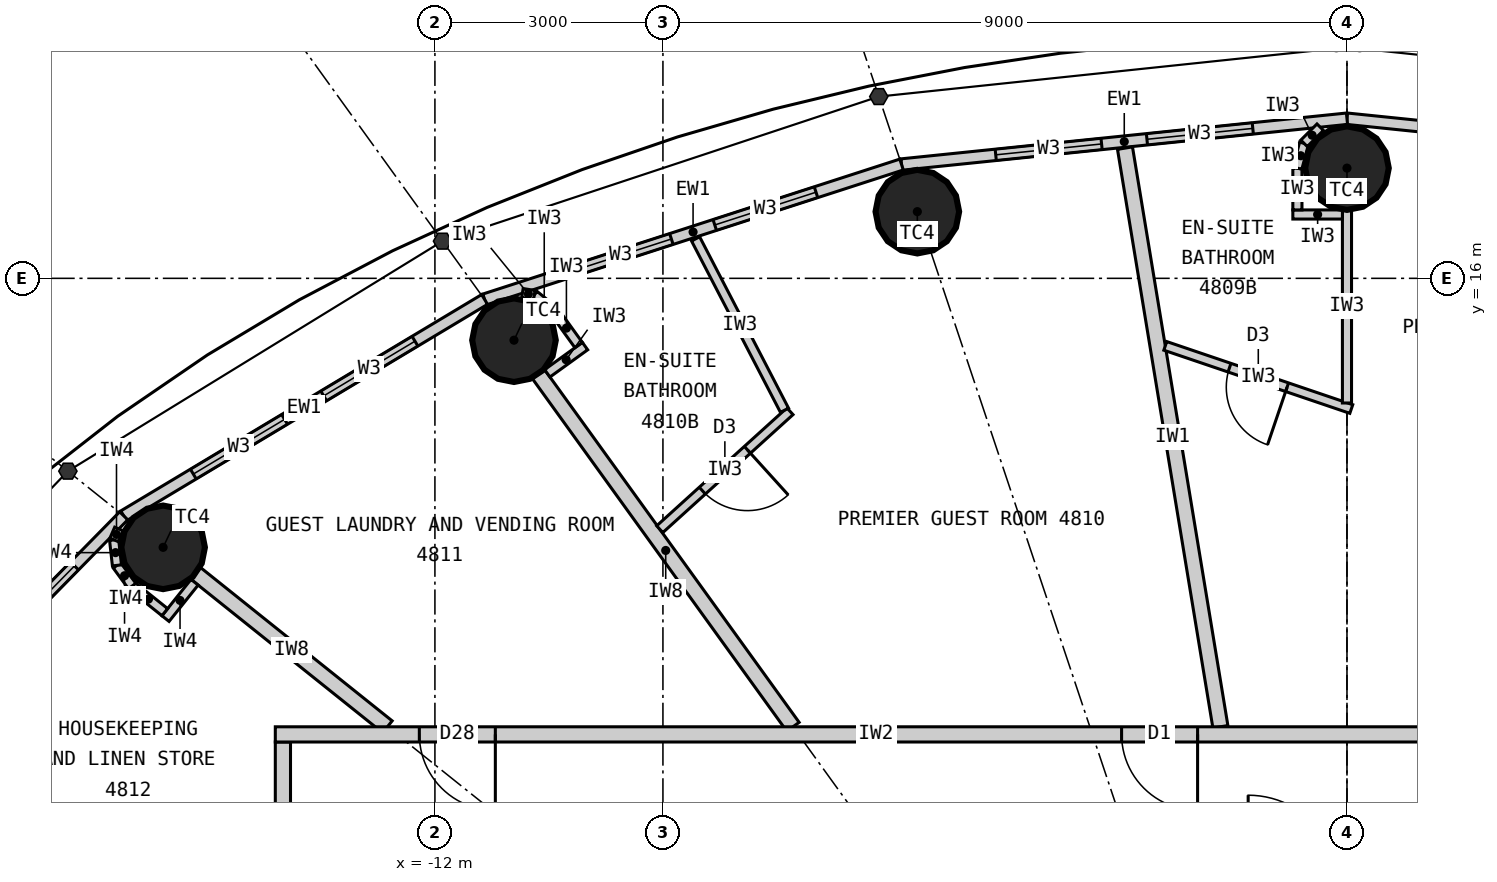
"""IFC4 building model, lengths in metres.
Left out: names, types, materials, properties, quantities, classifications, styles, units other than length and angle.
Written with IfcOpenShell. Run it as: python <this file> out.ifc"""

import sys

from ifc_helpers import new_model, si_unit, direction, frame, frame_2d, origin, origin_2d, place, context, subcontext, project, spatial, rectangle, circle, extrude, element, fill, save


model = new_model("IFC4")
c1 = context("Model", 3, precision=1e-05, world=origin(), true_north=direction((0.0, 1.0)))
c2 = subcontext(c1, "Body", "Model", "MODEL_VIEW")
j1 = project(units=[si_unit("LENGTHUNIT", "METRE"), si_unit("PLANEANGLEUNIT", "RADIAN")], contexts=[c1])
p1 = place(None, origin())
s1 = spatial("IfcSite", under=j1, at=p1, CompositionType="ELEMENT")
p2 = place(p1, origin())
s2 = spatial("IfcBuilding", under=s1, at=p2, CompositionType="ELEMENT")
p3 = place(p2, frame((0.0, 0.0, 179.7)))
s3 = spatial("IfcBuildingStorey", under=s2, at=p3, CompositionType="ELEMENT", Elevation=179.7)
for number, where, z_axis, x_axis in (
    (1, (0.0, 17.45, 0.0), (0.0, 0.0, 1.0), (1.0, 0.0, 0.0)),
    (2, (-5.653, 16.877, 0.0), (0.0, 0.0, 1.0), (1.0, 0.0, 0.0)),
    (3, (-10.96, 15.186, 0.0), (0.0, 0.0, 1.0), (1.0, 0.0, 0.0)),
    (4, (-15.576, 12.461, 0.0), (0.0, 0.0, 1.0), (1.0, 0.0, 0.0)),
):
    element("IfcColumn", number, at=place(p3, frame(where, z_axis=z_axis, x_axis=x_axis)), inside=s3, PredefinedType="COLUMN", context=c2, shape_type="SweptSolid", body=[
        extrude(circle(Radius=0.55, at=origin_2d()), origin(), (0.0, 0.0, 1.0), 3.3),
    ])
p4 = place(p3, frame((5.86, 17.497, 0.0), z_axis=(0.0, 0.0, 1.0), x_axis=(-0.994751738032, 0.102318032045, 0.0)))
e5 = element("IfcWall", 5, at=p4, inside=s3, PredefinedType="ELEMENTEDWALL", context=c2, shape_type="SweptSolid", body=[
    extrude(rectangle(XDim=5.891, YDim=0.15, at=frame_2d((2.946, 0.0))), origin(), (0.0, 0.0, 1.0), 3.12),
])
p5 = place(p4, frame((1.246, 0.0, 0.9)))
e6 = element("IfcOpeningElement", 6, at=p5, cuts=e5, PredefinedType="OPENING", context=c2, shape_type="SweptSolid", body=[
    extrude(rectangle(XDim=1.4, YDim=1.9, at=frame_2d((0.7, 0.95))), frame((0.0, 0.085, 0.0), z_axis=(0.0, -1.0, 0.0), x_axis=(1.0, 0.0, 0.0)), (0.0, 0.0, 1.0), 0.17),
])
p6 = place(p4, frame((3.246, 0.0, 0.9)))
e7 = element("IfcOpeningElement", 7, at=p6, cuts=e5, PredefinedType="OPENING", context=c2, shape_type="SweptSolid", body=[
    extrude(rectangle(XDim=1.4, YDim=1.9, at=frame_2d((0.7, 0.95))), frame((0.0, 0.085, 0.0), z_axis=(0.0, -1.0, 0.0), x_axis=(1.0, 0.0, 0.0)), (0.0, 0.0, 1.0), 0.17),
])
p7 = place(p3, frame((0.0, 18.1, 0.0), z_axis=(0.0, 0.0, 1.0), x_axis=(-0.994751738032, -0.102318032045, 0.0)))
e8 = element("IfcWall", 8, at=p7, inside=s3, PredefinedType="ELEMENTEDWALL", context=c2, shape_type="SweptSolid", body=[
    extrude(rectangle(XDim=5.891, YDim=0.15, at=frame_2d((2.946, 0.0))), origin(), (0.0, 0.0, 1.0), 3.12),
])
p8 = place(p7, frame((1.246, 0.0, 0.9)))
e9 = element("IfcOpeningElement", 9, at=p8, cuts=e8, PredefinedType="OPENING", context=c2, shape_type="SweptSolid", body=[
    extrude(rectangle(XDim=1.4, YDim=1.9, at=frame_2d((0.7, 0.95))), frame((0.0, 0.085, 0.0), z_axis=(0.0, -1.0, 0.0), x_axis=(1.0, 0.0, 0.0)), (0.0, 0.0, 1.0), 0.17),
])
p9 = place(p7, frame((3.246, 0.0, 0.9)))
e10 = element("IfcOpeningElement", 10, at=p9, cuts=e8, PredefinedType="OPENING", context=c2, shape_type="SweptSolid", body=[
    extrude(rectangle(XDim=1.4, YDim=1.9, at=frame_2d((0.7, 0.95))), frame((0.0, 0.085, 0.0), z_axis=(0.0, -1.0, 0.0), x_axis=(1.0, 0.0, 0.0)), (0.0, 0.0, 1.0), 0.17),
])
p10 = place(p3, frame((-5.86, 17.497, 0.0), z_axis=(0.0, 0.0, 1.0), x_axis=(-0.951432482129, -0.307857486429, 0.0)))
e11 = element("IfcWall", 11, at=p10, inside=s3, PredefinedType="ELEMENTEDWALL", context=c2, shape_type="SweptSolid", body=[
    extrude(rectangle(XDim=5.766, YDim=0.15, at=frame_2d((2.883, 0.0))), origin(), (0.0, 0.0, 1.0), 3.12),
])
p11 = place(p10, frame((1.183, 0.0, 0.9)))
e12 = element("IfcOpeningElement", 12, at=p11, cuts=e11, PredefinedType="OPENING", context=c2, shape_type="SweptSolid", body=[
    extrude(rectangle(XDim=1.4, YDim=1.9, at=frame_2d((0.7, 0.95))), frame((0.0, 0.085, 0.0), z_axis=(0.0, -1.0, 0.0), x_axis=(1.0, 0.0, 0.0)), (0.0, 0.0, 1.0), 0.17),
])
p12 = place(p10, frame((3.183, 0.0, 0.9)))
e13 = element("IfcOpeningElement", 13, at=p12, cuts=e11, PredefinedType="OPENING", context=c2, shape_type="SweptSolid", body=[
    extrude(rectangle(XDim=1.4, YDim=1.9, at=frame_2d((0.7, 0.95))), frame((0.0, 0.085, 0.0), z_axis=(0.0, -1.0, 0.0), x_axis=(1.0, 0.0, 0.0)), (0.0, 0.0, 1.0), 0.17),
])
p13 = place(p3, frame((-11.346, 15.722, 0.0), z_axis=(0.0, 0.0, 1.0), x_axis=(-0.857695199231, -0.514158482587, 0.0)))
e14 = element("IfcWall", 14, at=p13, inside=s3, PredefinedType="ELEMENTEDWALL", context=c2, shape_type="SweptSolid", body=[
    extrude(rectangle(XDim=5.536, YDim=0.15, at=frame_2d((2.768, 0.0))), origin(), (0.0, 0.0, 1.0), 3.12),
])
p14 = place(p13, frame((1.068, 0.0, 0.9)))
e15 = element("IfcOpeningElement", 15, at=p14, cuts=e14, PredefinedType="OPENING", context=c2, shape_type="SweptSolid", body=[
    extrude(rectangle(XDim=1.4, YDim=1.9, at=frame_2d((0.7, 0.95))), frame((0.0, 0.085, 0.0), z_axis=(0.0, -1.0, 0.0), x_axis=(1.0, 0.0, 0.0)), (0.0, 0.0, 1.0), 0.17),
])
p15 = place(p13, frame((3.068, 0.0, 0.9)))
e16 = element("IfcOpeningElement", 16, at=p15, cuts=e14, PredefinedType="OPENING", context=c2, shape_type="SweptSolid", body=[
    extrude(rectangle(XDim=1.4, YDim=1.9, at=frame_2d((0.7, 0.95))), frame((0.0, 0.085, 0.0), z_axis=(0.0, -1.0, 0.0), x_axis=(1.0, 0.0, 0.0)), (0.0, 0.0, 1.0), 0.17),
])
p16 = place(p3, frame((-16.095, 12.876, 0.0), z_axis=(0.0, 0.0, 1.0), x_axis=(-0.700727467776, -0.71342905457, 0.0)))
e17 = element("IfcWall", 17, at=p16, inside=s3, PredefinedType="ELEMENTEDWALL", context=c2, shape_type="SweptSolid", body=[
    extrude(rectangle(XDim=5.247, YDim=0.15, at=frame_2d((2.624, 0.0))), origin(), (0.0, 0.0, 1.0), 3.12),
])
p17 = place(p16, frame((0.924, 0.0, 0.9)))
e18 = element("IfcOpeningElement", 18, at=p17, cuts=e17, PredefinedType="OPENING", context=c2, shape_type="SweptSolid", body=[
    extrude(rectangle(XDim=1.4, YDim=1.9, at=frame_2d((0.7, 0.95))), frame((0.0, 0.085, 0.0), z_axis=(0.0, -1.0, 0.0), x_axis=(1.0, 0.0, 0.0)), (0.0, 0.0, 1.0), 0.17),
])
p18 = place(p16, frame((2.924, 0.0, 0.9)))
e19 = element("IfcOpeningElement", 19, at=p18, cuts=e17, PredefinedType="OPENING", context=c2, shape_type="SweptSolid", body=[
    extrude(rectangle(XDim=1.4, YDim=1.9, at=frame_2d((0.7, 0.95))), frame((0.0, 0.085, 0.0), z_axis=(0.0, -1.0, 0.0), x_axis=(1.0, 0.0, 0.0)), (0.0, 0.0, 1.0), 0.17),
])
p19 = place(p3, frame((-14.0, 9.9, 0.0), z_axis=(0.0, 0.0, 1.0), x_axis=(0.0, -1.0, 0.0)))
e20 = element("IfcWall", 20, at=p19, inside=s3, PredefinedType="PARTITIONING", context=c2, shape_type="SweptSolid", body=[
    extrude(rectangle(XDim=19.8, YDim=0.2, at=frame_2d((9.9, 0.0))), origin(), (0.0, 0.0, 1.0), 3.12),
])
p20 = place(p19, frame((13.853, 0.0, 0.0)))
e21 = element("IfcOpeningElement", 21, at=p20, cuts=e20, PredefinedType="OPENING", context=c2, shape_type="SweptSolid", body=[
    extrude(rectangle(XDim=1.0, YDim=2.2, at=frame_2d((0.5, 1.1))), frame((0.0, 0.11, 0.0), z_axis=(0.0, -1.0, 0.0), x_axis=(1.0, 0.0, 0.0)), (0.0, 0.0, 1.0), 0.22),
])
p21 = place(p19, frame((1.1, 0.0, 0.0)))
e22 = element("IfcOpeningElement", 22, at=p21, cuts=e20, PredefinedType="OPENING", context=c2, shape_type="SweptSolid", body=[
    extrude(rectangle(XDim=1.0, YDim=2.2, at=frame_2d((0.5, 1.1))), frame((0.0, 0.11, 0.0), z_axis=(0.0, -1.0, 0.0), x_axis=(1.0, 0.0, 0.0)), (0.0, 0.0, 1.0), 0.22),
])
p22 = place(p19, frame((3.688, 0.0, 0.0)))
e23 = element("IfcOpeningElement", 23, at=p22, cuts=e20, PredefinedType="OPENING", context=c2, shape_type="SweptSolid", body=[
    extrude(rectangle(XDim=1.0, YDim=2.2, at=frame_2d((0.5, 1.1))), frame((0.0, 0.11, 0.0), z_axis=(0.0, -1.0, 0.0), x_axis=(1.0, 0.0, 0.0)), (0.0, 0.0, 1.0), 0.22),
])
p23 = place(p19, frame((8.719, 0.0, 0.0)))
e24 = element("IfcOpeningElement", 24, at=p23, cuts=e20, PredefinedType="OPENING", context=c2, shape_type="SweptSolid", body=[
    extrude(rectangle(XDim=1.0, YDim=2.2, at=frame_2d((0.5, 1.1))), frame((0.0, 0.11, 0.0), z_axis=(0.0, -1.0, 0.0), x_axis=(1.0, 0.0, 0.0)), (0.0, 0.0, 1.0), 0.22),
])
p24 = place(p3, frame((-1.666, 10.1, 0.0), z_axis=(0.0, 0.0, 1.0), x_axis=(-0.162669562982, 0.986680603478, 0.0)))
e25 = element("IfcWall", 25, at=p24, inside=s3, PredefinedType="PARTITIONING", context=c2, shape_type="SweptSolid", body=[
    extrude(rectangle(XDim=7.716, YDim=0.2, at=frame_2d((3.858, 0.0))), origin(), (0.0, 0.0, 1.0), 3.12),
])
p25 = place(p3, frame((-7.289, 10.1, 0.0), z_axis=(0.0, 0.0, 1.0), x_axis=(-0.585222595178, 0.810872686735, 0.0)))
e26 = element("IfcWall", 26, at=p25, inside=s3, PredefinedType="PARTITIONING", context=c2, shape_type="SweptSolid", body=[
    extrude(rectangle(XDim=5.722, YDim=0.2, at=frame_2d((2.861, 0.0))), origin(), (0.0, 0.0, 1.0), 2.27),
])
p26 = place(p3, frame((-12.625, 10.1, 0.0), z_axis=(0.0, 0.0, 1.0), x_axis=(-0.780876185034, 0.624685827954, 0.0)))
e27 = element("IfcWall", 27, at=p26, inside=s3, PredefinedType="PARTITIONING", context=c2, shape_type="SweptSolid", body=[
    extrude(rectangle(XDim=3.229, YDim=0.2, at=frame_2d((1.615, 0.0))), origin(), (0.0, 0.0, 1.0), 2.27),
])
p27 = place(p3, frame((-2.39, 15.111, 0.0), z_axis=(0.0, 0.0, 1.0), x_axis=(0.946949953534, -0.321381059649, 0.0)))
e28 = element("IfcWall", 28, at=p27, inside=s3, PredefinedType="PARTITIONING", context=c2, shape_type="SweptSolid", body=[
    extrude(rectangle(XDim=2.584, YDim=0.12, at=frame_2d((1.292, 0.0))), origin(), (0.0, 0.0, 1.0), 3.12),
])
p28 = place(p27, frame((0.892, 0.0, 0.0)))
e29 = element("IfcOpeningElement", 29, at=p28, cuts=e28, PredefinedType="OPENING", context=c2, shape_type="SweptSolid", body=[
    extrude(rectangle(XDim=0.8, YDim=2.1, at=frame_2d((0.4, 1.05))), frame((0.0, 0.07, 0.0), z_axis=(0.0, -1.0, 0.0), x_axis=(1.0, 0.0, 0.0)), (0.0, 0.0, 1.0), 0.14),
])
p29 = place(p3, frame((0.0, 14.36, 0.0), z_axis=(0.0, 0.0, 1.0), x_axis=(0.0, 1.0, 0.0)))
e30 = element("IfcWall", 30, at=p29, inside=s3, PredefinedType="PARTITIONING", context=c2, shape_type="SweptSolid", body=[
    extrude(rectangle(XDim=2.54, YDim=0.12, at=frame_2d((1.27, 0.0))), origin(), (0.0, 0.0, 1.0), 2.27),
])
p30 = place(p3, frame((-0.06, 16.84, 0.0), z_axis=(0.0, 0.0, 1.0), x_axis=(-1.0, 0.0, 0.0)))
e31 = element("IfcWall", 31, at=p30, inside=s3, PredefinedType="PARTITIONING", context=c2, shape_type="SweptSolid", body=[
    extrude(rectangle(XDim=0.652, YDim=0.12, at=frame_2d((0.326, 0.0))), origin(), (0.0, 0.0, 1.0), 3.12),
])
p31 = place(p3, frame((-0.652, 16.9, 0.0), z_axis=(0.0, 0.0, 1.0), x_axis=(0.0, 1.0, 0.0)))
e32 = element("IfcWall", 32, at=p31, inside=s3, PredefinedType="PARTITIONING", context=c2, shape_type="SweptSolid", body=[
    extrude(rectangle(XDim=0.55, YDim=0.12, at=frame_2d((0.275, 0.0))), origin(), (0.0, 0.0, 1.0), 3.12),
])
p32 = place(p3, frame((-0.652, 17.45, 0.0), z_axis=(0.0, 0.0, 1.0), x_axis=(0.258832454679, 0.965922233104, 0.0)))
e33 = element("IfcWall", 33, at=p32, inside=s3, PredefinedType="PARTITIONING", context=c2, shape_type="SweptSolid", body=[
    extrude(rectangle(XDim=0.338, YDim=0.12, at=frame_2d((0.169, 0.0))), origin(), (0.0, 0.0, 1.0), 3.12),
])
p33 = place(p3, frame((-0.565, 17.776, 0.0), z_axis=(0.0, 0.0, 1.0), x_axis=(0.707106781187, 0.707106781187, 0.0)))
e34 = element("IfcWall", 34, at=p33, inside=s3, PredefinedType="PARTITIONING", context=c2, shape_type="SweptSolid", body=[
    extrude(rectangle(XDim=0.301, YDim=0.12, at=frame_2d((0.15, 0.0))), origin(), (0.0, 0.0, 1.0), 3.12),
])
p34 = place(p3, frame((-9.042, 12.699, 0.0), z_axis=(0.0, 0.0, 1.0), x_axis=(0.741100257539, 0.671394376112, 0.0)))
e35 = element("IfcWall", 35, at=p34, inside=s3, PredefinedType="PARTITIONING", context=c2, shape_type="SweptSolid", body=[
    extrude(rectangle(XDim=2.312, YDim=0.12, at=frame_2d((1.156, 0.0))), origin(), (0.0, 0.0, 1.0), 3.12),
])
p35 = place(p34, frame((0.756, 0.0, 0.0)))
e36 = element("IfcOpeningElement", 36, at=p35, cuts=e35, PredefinedType="OPENING", context=c2, shape_type="SweptSolid", body=[
    extrude(rectangle(XDim=0.8, YDim=2.1, at=frame_2d((0.4, 1.05))), frame((0.0, 0.07, 0.0), z_axis=(0.0, -1.0, 0.0), x_axis=(1.0, 0.0, 0.0)), (0.0, 0.0, 1.0), 0.14),
])
p36 = place(p3, frame((-7.401, 14.264, 0.0), z_axis=(0.0, 0.0, 1.0), x_axis=(-0.460505131319, 0.887657041897, 0.0)))
e37 = element("IfcWall", 37, at=p36, inside=s3, PredefinedType="PARTITIONING", context=c2, shape_type="SweptSolid", body=[
    extrude(rectangle(XDim=2.54, YDim=0.12, at=frame_2d((1.27, 0.0))), origin(), (0.0, 0.0, 1.0), 3.12),
])
p37 = place(p3, frame((-10.522, 14.75, 0.0), z_axis=(0.0, 0.0, 1.0), x_axis=(0.811057588427, 0.584966313777, 0.0)))
e38 = element("IfcWall", 38, at=p37, inside=s3, PredefinedType="PARTITIONING", context=c2, shape_type="SweptSolid", body=[
    extrude(rectangle(XDim=0.612, YDim=0.12, at=frame_2d((0.306, 0.0))), origin(), (0.0, 0.0, 1.0), 3.12),
])
p38 = place(p3, frame((-10.109, 15.122, 0.0), z_axis=(0.0, 0.0, 1.0), x_axis=(-0.585344718358, 0.810784534072, 0.0)))
e39 = element("IfcWall", 39, at=p38, inside=s3, PredefinedType="PARTITIONING", context=c2, shape_type="SweptSolid", body=[
    extrude(rectangle(XDim=0.55, YDim=0.12, at=frame_2d((0.275, 0.0))), origin(), (0.0, 0.0, 1.0), 3.12),
])
p39 = place(p3, frame((-10.431, 15.568, 0.0), z_axis=(0.0, 0.0, 1.0), x_axis=(-0.77505137267, 0.631898227345, 0.0)))
e40 = element("IfcWall", 40, at=p39, inside=s3, PredefinedType="PARTITIONING", context=c2, shape_type="SweptSolid", body=[
    extrude(rectangle(XDim=0.338, YDim=0.12, at=frame_2d((0.169, 0.0))), origin(), (0.0, 0.0, 1.0), 3.12),
])
p40 = place(p3, frame((-10.693, 15.781, 0.0), z_axis=(0.0, 0.0, 1.0), x_axis=(-0.987256785332, 0.159135287777, 0.0)))
e41 = element("IfcWall", 41, at=p40, inside=s3, PredefinedType="PARTITIONING", context=c2, shape_type="SweptSolid", body=[
    extrude(rectangle(XDim=0.158, YDim=0.12, at=frame_2d((0.079, 0.0))), origin(), (0.0, 0.0, 1.0), 3.12),
])
p41 = place(p3, frame((-14.1, 10.0, 0.0), z_axis=(0.0, 0.0, 1.0), x_axis=(1.0, 0.0, 0.0)))
e42 = element("IfcWall", 42, at=p41, inside=s3, PredefinedType="PARTITIONING", context=c2, shape_type="SweptSolid", body=[
    extrude(rectangle(XDim=15.808, YDim=0.2, at=frame_2d((7.904, 0.0))), origin(), (0.0, 0.0, 1.0), 3.12),
])
p42 = place(p41, frame((11.135, 0.0, 0.0)))
e43 = element("IfcOpeningElement", 43, at=p42, cuts=e42, PredefinedType="OPENING", context=c2, shape_type="SweptSolid", body=[
    extrude(rectangle(XDim=1.0, YDim=2.2, at=frame_2d((0.5, 1.1))), frame((0.0, 0.11, 0.0), z_axis=(0.0, -1.0, 0.0), x_axis=(1.0, 0.0, 0.0)), (0.0, 0.0, 1.0), 0.22),
])
p43 = place(p41, frame((1.895, 0.0, 0.0)))
e44 = element("IfcOpeningElement", 44, at=p43, cuts=e42, PredefinedType="OPENING", context=c2, shape_type="SweptSolid", body=[
    extrude(rectangle(XDim=1.0, YDim=2.2, at=frame_2d((0.5, 1.1))), frame((0.0, 0.11, 0.0), z_axis=(0.0, -1.0, 0.0), x_axis=(1.0, 0.0, 0.0)), (0.0, 0.0, 1.0), 0.22),
])
p44 = place(p3, frame((-15.162, 12.002, 0.0), z_axis=(0.0, 0.0, 1.0), x_axis=(-0.624597762427, -0.780946627607, 0.0)))
e45 = element("IfcWall", 45, at=p44, inside=s3, PredefinedType="PARTITIONING", context=c2, shape_type="SweptSolid", body=[
    extrude(rectangle(XDim=0.612, YDim=0.12, at=frame_2d((0.306, 0.0))), origin(), (0.0, 0.0, 1.0), 3.12),
])
p45 = place(p3, frame((-15.554, 11.608, 0.0), z_axis=(0.0, 0.0, 1.0), x_axis=(-0.780695577787, 0.624911525597, 0.0)))
e46 = element("IfcWall", 46, at=p45, inside=s3, PredefinedType="PARTITIONING", context=c2, shape_type="SweptSolid", body=[
    extrude(rectangle(XDim=0.55, YDim=0.12, at=frame_2d((0.275, 0.0))), origin(), (0.0, 0.0, 1.0), 3.12),
])
p46 = place(p3, frame((-15.984, 11.952, 0.0), z_axis=(0.0, 0.0, 1.0), x_axis=(-0.592335221171, 0.805691619517, 0.0)))
e47 = element("IfcWall", 47, at=p46, inside=s3, PredefinedType="PARTITIONING", context=c2, shape_type="SweptSolid", body=[
    extrude(rectangle(XDim=0.338, YDim=0.12, at=frame_2d((0.169, 0.0))), origin(), (0.0, 0.0, 1.0), 3.12),
])
p47 = place(p3, frame((-16.184, 12.224, 0.0), z_axis=(0.0, 0.0, 1.0), x_axis=(-0.110669692975, 0.993857242795, 0.0)))
e48 = element("IfcWall", 48, at=p47, inside=s3, PredefinedType="PARTITIONING", context=c2, shape_type="SweptSolid", body=[
    extrude(rectangle(XDim=0.337, YDim=0.12, at=frame_2d((0.169, 0.0))), origin(), (0.0, 0.0, 1.0), 3.12),
])
p48 = place(p3, frame((-16.221, 12.559, 0.0), z_axis=(0.0, 0.0, 1.0), x_axis=(0.401064416249, 0.916049853457, 0.0)))
e49 = element("IfcWall", 49, at=p48, inside=s3, PredefinedType="PARTITIONING", context=c2, shape_type="SweptSolid", body=[
    extrude(rectangle(XDim=0.156, YDim=0.12, at=frame_2d((0.078, 0.0))), origin(), (0.0, 0.0, 1.0), 3.12),
])
p49 = place(p8, origin())
e50 = element("IfcWindow", 50, at=p49, inside=s3, PartitioningType="SINGLE_PANEL", PredefinedType="WINDOW", context=c2, shape_type="SweptSolid", body=[
    extrude(rectangle(XDim=1.4, YDim=1.9, at=frame_2d((0.7, 0.95))), frame((0.0, 0.03, 0.0), z_axis=(0.0, -1.0, 0.0), x_axis=(1.0, 0.0, 0.0)), (0.0, 0.0, 1.0), 0.06),
])
fill(e9, e50)
p50 = place(p9, origin())
e51 = element("IfcWindow", 51, at=p50, inside=s3, PartitioningType="SINGLE_PANEL", PredefinedType="WINDOW", context=c2, shape_type="SweptSolid", body=[
    extrude(rectangle(XDim=1.4, YDim=1.9, at=frame_2d((0.7, 0.95))), frame((0.0, 0.03, 0.0), z_axis=(0.0, -1.0, 0.0), x_axis=(1.0, 0.0, 0.0)), (0.0, 0.0, 1.0), 0.06),
])
fill(e10, e51)
p51 = place(p11, origin())
e52 = element("IfcWindow", 52, at=p51, inside=s3, PartitioningType="SINGLE_PANEL", PredefinedType="WINDOW", context=c2, shape_type="SweptSolid", body=[
    extrude(rectangle(XDim=1.4, YDim=1.9, at=frame_2d((0.7, 0.95))), frame((0.0, 0.03, 0.0), z_axis=(0.0, -1.0, 0.0), x_axis=(1.0, 0.0, 0.0)), (0.0, 0.0, 1.0), 0.06),
])
fill(e12, e52)
p52 = place(p12, origin())
e53 = element("IfcWindow", 53, at=p52, inside=s3, PartitioningType="SINGLE_PANEL", PredefinedType="WINDOW", context=c2, shape_type="SweptSolid", body=[
    extrude(rectangle(XDim=1.4, YDim=1.9, at=frame_2d((0.7, 0.95))), frame((0.0, 0.03, 0.0), z_axis=(0.0, -1.0, 0.0), x_axis=(1.0, 0.0, 0.0)), (0.0, 0.0, 1.0), 0.06),
])
fill(e13, e53)
p53 = place(p14, origin())
e54 = element("IfcWindow", 54, at=p53, inside=s3, PartitioningType="SINGLE_PANEL", PredefinedType="WINDOW", context=c2, shape_type="SweptSolid", body=[
    extrude(rectangle(XDim=1.4, YDim=1.9, at=frame_2d((0.7, 0.95))), frame((0.0, 0.03, 0.0), z_axis=(0.0, -1.0, 0.0), x_axis=(1.0, 0.0, 0.0)), (0.0, 0.0, 1.0), 0.06),
])
fill(e15, e54)
p54 = place(p15, origin())
e55 = element("IfcWindow", 55, at=p54, inside=s3, PartitioningType="SINGLE_PANEL", PredefinedType="WINDOW", context=c2, shape_type="SweptSolid", body=[
    extrude(rectangle(XDim=1.4, YDim=1.9, at=frame_2d((0.7, 0.95))), frame((0.0, 0.03, 0.0), z_axis=(0.0, -1.0, 0.0), x_axis=(1.0, 0.0, 0.0)), (0.0, 0.0, 1.0), 0.06),
])
fill(e16, e55)
p55 = place(p17, origin())
e56 = element("IfcWindow", 56, at=p55, inside=s3, PartitioningType="SINGLE_PANEL", PredefinedType="WINDOW", context=c2, shape_type="SweptSolid", body=[
    extrude(rectangle(XDim=1.4, YDim=1.9, at=frame_2d((0.7, 0.95))), frame((0.0, 0.03, 0.0), z_axis=(0.0, -1.0, 0.0), x_axis=(1.0, 0.0, 0.0)), (0.0, 0.0, 1.0), 0.06),
])
fill(e18, e56)
p56 = place(p28, origin())
e57 = element("IfcDoor", 57, at=p56, inside=s3, OperationType="SINGLE_SWING_RIGHT", PredefinedType="DOOR", context=c2, shape_type="SweptSolid", body=[
    extrude(rectangle(XDim=0.8, YDim=2.1, at=frame_2d((0.4, 1.05))), frame((0.0, 0.025, 0.0), z_axis=(0.0, -1.0, 0.0), x_axis=(1.0, 0.0, 0.0)), (0.0, 0.0, 1.0), 0.05),
])
fill(e29, e57)
p57 = place(p35, origin())
e58 = element("IfcDoor", 58, at=p57, inside=s3, OperationType="SINGLE_SWING_RIGHT", PredefinedType="DOOR", context=c2, shape_type="SweptSolid", body=[
    extrude(rectangle(XDim=0.8, YDim=2.1, at=frame_2d((0.4, 1.05))), frame((0.0, 0.025, 0.0), z_axis=(0.0, -1.0, 0.0), x_axis=(1.0, 0.0, 0.0)), (0.0, 0.0, 1.0), 0.05),
])
fill(e36, e58)
p58 = place(p42, origin())
e59 = element("IfcDoor", 59, at=p58, inside=s3, OperationType="SINGLE_SWING_RIGHT", PredefinedType="DOOR", context=c2, shape_type="SweptSolid", body=[
    extrude(rectangle(XDim=1.0, YDim=2.2, at=frame_2d((0.5, 1.1))), frame((0.0, 0.025, 0.0), z_axis=(0.0, -1.0, 0.0), x_axis=(1.0, 0.0, 0.0)), (0.0, 0.0, 1.0), 0.05),
])
fill(e43, e59)
p59 = place(p43, origin())
e60 = element("IfcDoor", 60, at=p59, inside=s3, OperationType="SINGLE_SWING_RIGHT", PredefinedType="DOOR", context=c2, shape_type="SweptSolid", body=[
    extrude(rectangle(XDim=1.0, YDim=2.2, at=frame_2d((0.5, 1.1))), frame((0.0, 0.025, 0.0), z_axis=(0.0, -1.0, 0.0), x_axis=(1.0, 0.0, 0.0)), (0.0, 0.0, 1.0), 0.05),
])
fill(e44, e60)
save(model, sys.argv[1])
